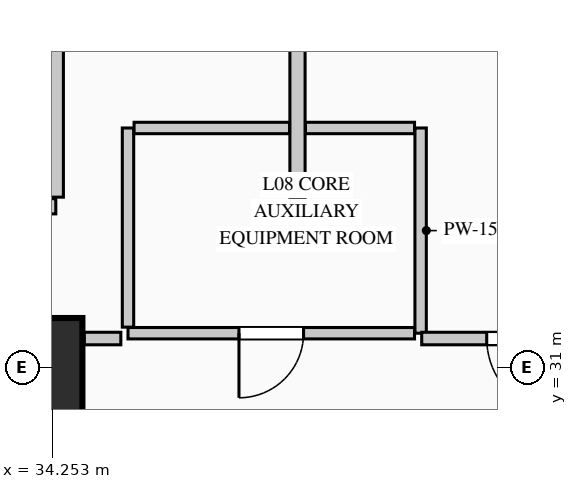
"""IFC4 building model, lengths in metres.
Left out: names, types, materials, properties, quantities, classifications, styles, units other than length and angle.
Written with IfcOpenShell. Run it as: python <this file> out.ifc"""

import sys

from ifc_helpers import new_model, si_unit, direction, frame, frame_2d, origin, origin_2d, place, context, subcontext, project, spatial, rectangle, extrude, element, fill, save


model = new_model("IFC4")
c1 = context("Model", 3, precision=1e-05, world=origin(), true_north=direction((0.0, 1.0)))
c2 = subcontext(c1, "Body", "Model", "MODEL_VIEW")
j1 = project(units=[si_unit("LENGTHUNIT", "METRE"), si_unit("PLANEANGLEUNIT", "RADIAN")], contexts=[c1])
p1 = place(None, origin())
s1 = spatial("IfcSite", under=j1, at=p1, CompositionType="ELEMENT")
p2 = place(p1, origin())
s2 = spatial("IfcBuilding", under=s1, at=p2, CompositionType="ELEMENT")
p3 = place(p2, frame((0.0, 0.0, 35.8)))
s3 = spatial("IfcBuildingStorey", under=s2, at=p3, CompositionType="ELEMENT", Elevation=35.8)
p4 = place(p3, frame((34.0, 31.0, 0.0), z_axis=(0.0, 0.0, 1.0), x_axis=(1.0, 0.0, 0.0)))
e1 = element("IfcColumn", 1, at=p4, inside=s3, PredefinedType="COLUMN", context=c2, shape_type="SweptSolid", body=[
    extrude(rectangle(XDim=1.3, YDim=1.3, at=origin_2d()), origin(), (0.0, 0.0, 1.0), 4.4),
])
p5 = place(p3, frame((37.48, 33.24, 0.0), z_axis=(0.0, 0.0, 1.0), x_axis=(0.0, 1.0, 0.0)))
e2 = element("IfcWall", 2, at=p5, inside=s3, PredefinedType="PARTITIONING", context=c2, shape_type="SweptSolid", body=[
    extrude(rectangle(XDim=7.42, YDim=0.2, at=frame_2d((3.71, 0.0))), origin(), (0.0, 0.0, 1.0), 4.1),
])
p6 = place(p3, frame((30.5, 33.12, 0.0), z_axis=(0.0, 0.0, 1.0), x_axis=(1.0, 0.0, 0.0)))
e3 = element("IfcWall", 3, at=p6, inside=s3, PredefinedType="PARTITIONING", context=c2, shape_type="SweptSolid", body=[
    extrude(rectangle(XDim=3.8, YDim=0.2, at=frame_2d((1.9, 0.0))), origin(), (0.0, 0.0, 1.0), 4.1),
])
p7 = place(p3, frame((34.3, 33.24, 0.0), z_axis=(0.0, 0.0, 1.0), x_axis=(0.0, 1.0, 0.0)))
e4 = element("IfcWall", 4, at=p7, inside=s3, PredefinedType="PARTITIONING", context=c2, shape_type="SweptSolid", body=[
    extrude(rectangle(XDim=2.17, YDim=0.2, at=frame_2d((1.085, 0.0))), origin(), (0.0, 0.0, 1.0), 4.1),
])
p8 = place(p3, frame((39.1, 34.15, 0.0), z_axis=(0.0, 0.0, 1.0), x_axis=(0.0, -1.0, 0.0)))
e5 = element("IfcWall", 5, at=p8, inside=s3, PredefinedType="PARTITIONING", context=c2, shape_type="SweptSolid", body=[
    extrude(rectangle(XDim=2.7, YDim=0.15, at=frame_2d((1.35, 0.0))), origin(), (0.0, 0.0, 1.0), 4.1),
])
p9 = place(p3, frame((39.02, 31.45, 0.0), z_axis=(0.0, 0.0, 1.0), x_axis=(-1.0, 0.0, 0.0)))
e6 = element("IfcWall", 6, at=p9, inside=s3, PredefinedType="PARTITIONING", context=c2, shape_type="SweptSolid", body=[
    extrude(rectangle(XDim=3.77, YDim=0.15, at=frame_2d((1.885, 0.0))), origin(), (0.0, 0.0, 1.0), 4.1),
])
p10 = place(p9, frame((1.46, 0.0, 0.0)))
e7 = element("IfcOpeningElement", 7, at=p10, cuts=e6, PredefinedType="OPENING", context=c2, shape_type="SweptSolid", body=[
    extrude(rectangle(XDim=0.85, YDim=2.1, at=frame_2d((0.425, 1.05))), frame((0.0, 0.085, 0.0), z_axis=(0.0, -1.0, 0.0), x_axis=(1.0, 0.0, 0.0)), (0.0, 0.0, 1.0), 0.17),
])
p11 = place(p3, frame((35.25, 31.53, 0.0), z_axis=(0.0, 0.0, 1.0), x_axis=(0.0, 1.0, 0.0)))
e8 = element("IfcWall", 8, at=p11, inside=s3, PredefinedType="PARTITIONING", context=c2, shape_type="SweptSolid", body=[
    extrude(rectangle(XDim=2.62, YDim=0.15, at=frame_2d((1.31, 0.0))), origin(), (0.0, 0.0, 1.0), 4.1),
])
p12 = place(p3, frame((37.585, 34.15, 0.0), z_axis=(0.0, 0.0, 1.0), x_axis=(1.0, 0.0, 0.0)))
e9 = element("IfcWall", 9, at=p12, inside=s3, PredefinedType="PARTITIONING", context=c2, shape_type="SweptSolid", body=[
    extrude(rectangle(XDim=1.435, YDim=0.15, at=frame_2d((0.718, 0.0))), origin(), (0.0, 0.0, 1.0), 4.1),
])
p13 = place(p3, frame((35.33, 34.15, 0.0), z_axis=(0.0, 0.0, 1.0), x_axis=(1.0, 0.0, 0.0)))
e10 = element("IfcWall", 10, at=p13, inside=s3, PredefinedType="PARTITIONING", context=c2, shape_type="SweptSolid", body=[
    extrude(rectangle(XDim=2.045, YDim=0.15, at=frame_2d((1.022, 0.0))), origin(), (0.0, 0.0, 1.0), 4.1),
])
p14 = place(p3, frame((41.825, 31.38, 0.0), z_axis=(0.0, 0.0, 1.0), x_axis=(-1.0, 0.0, 0.0)))
e11 = element("IfcWall", 11, at=p14, inside=s3, PredefinedType="PARTITIONING", context=c2, shape_type="SweptSolid", body=[
    extrude(rectangle(XDim=2.71, YDim=0.165, at=frame_2d((1.355, 0.0))), origin(), (0.0, 0.0, 1.0), 4.1),
])
p15 = place(p14, frame((0.855, 0.0, 0.0)))
e12 = element("IfcOpeningElement", 12, at=p15, cuts=e11, PredefinedType="OPENING", context=c2, shape_type="SweptSolid", body=[
    extrude(rectangle(XDim=1.0, YDim=2.15, at=frame_2d((0.5, 1.075))), frame((0.0, 0.093, 0.0), z_axis=(0.0, -1.0, 0.0), x_axis=(1.0, 0.0, 0.0)), (0.0, 0.0, 1.0), 0.185),
])
p16 = place(p3, frame((35.156, 31.38, 0.0), z_axis=(0.0, 0.0, 1.0), x_axis=(-1.0, 0.0, 0.0)))
e13 = element("IfcWall", 13, at=p16, inside=s3, PredefinedType="PARTITIONING", context=c2, shape_type="SweptSolid", body=[
    extrude(rectangle(XDim=0.48, YDim=0.165, at=frame_2d((0.24, 0.0))), origin(), (0.0, 0.0, 1.0), 4.1),
])
p17 = place(p10, origin())
e14 = element("IfcDoor", 14, at=p17, inside=s3, OperationType="SINGLE_SWING_RIGHT", PredefinedType="DOOR", context=c2, shape_type="SweptSolid", body=[
    extrude(rectangle(XDim=0.85, YDim=2.1, at=frame_2d((0.425, 1.05))), frame((0.0, 0.025, 0.0), z_axis=(0.0, -1.0, 0.0), x_axis=(1.0, 0.0, 0.0)), (0.0, 0.0, 1.0), 0.05),
])
fill(e7, e14)
p18 = place(p15, origin())
e15 = element("IfcDoor", 15, at=p18, inside=s3, OperationType="SINGLE_SWING_LEFT", PredefinedType="DOOR", context=c2, shape_type="SweptSolid", body=[
    extrude(rectangle(XDim=1.0, YDim=2.15, at=frame_2d((0.5, 1.075))), frame((0.0, 0.025, 0.0), z_axis=(0.0, -1.0, 0.0), x_axis=(1.0, 0.0, 0.0)), (0.0, 0.0, 1.0), 0.05),
])
fill(e12, e15)
save(model, sys.argv[1])
